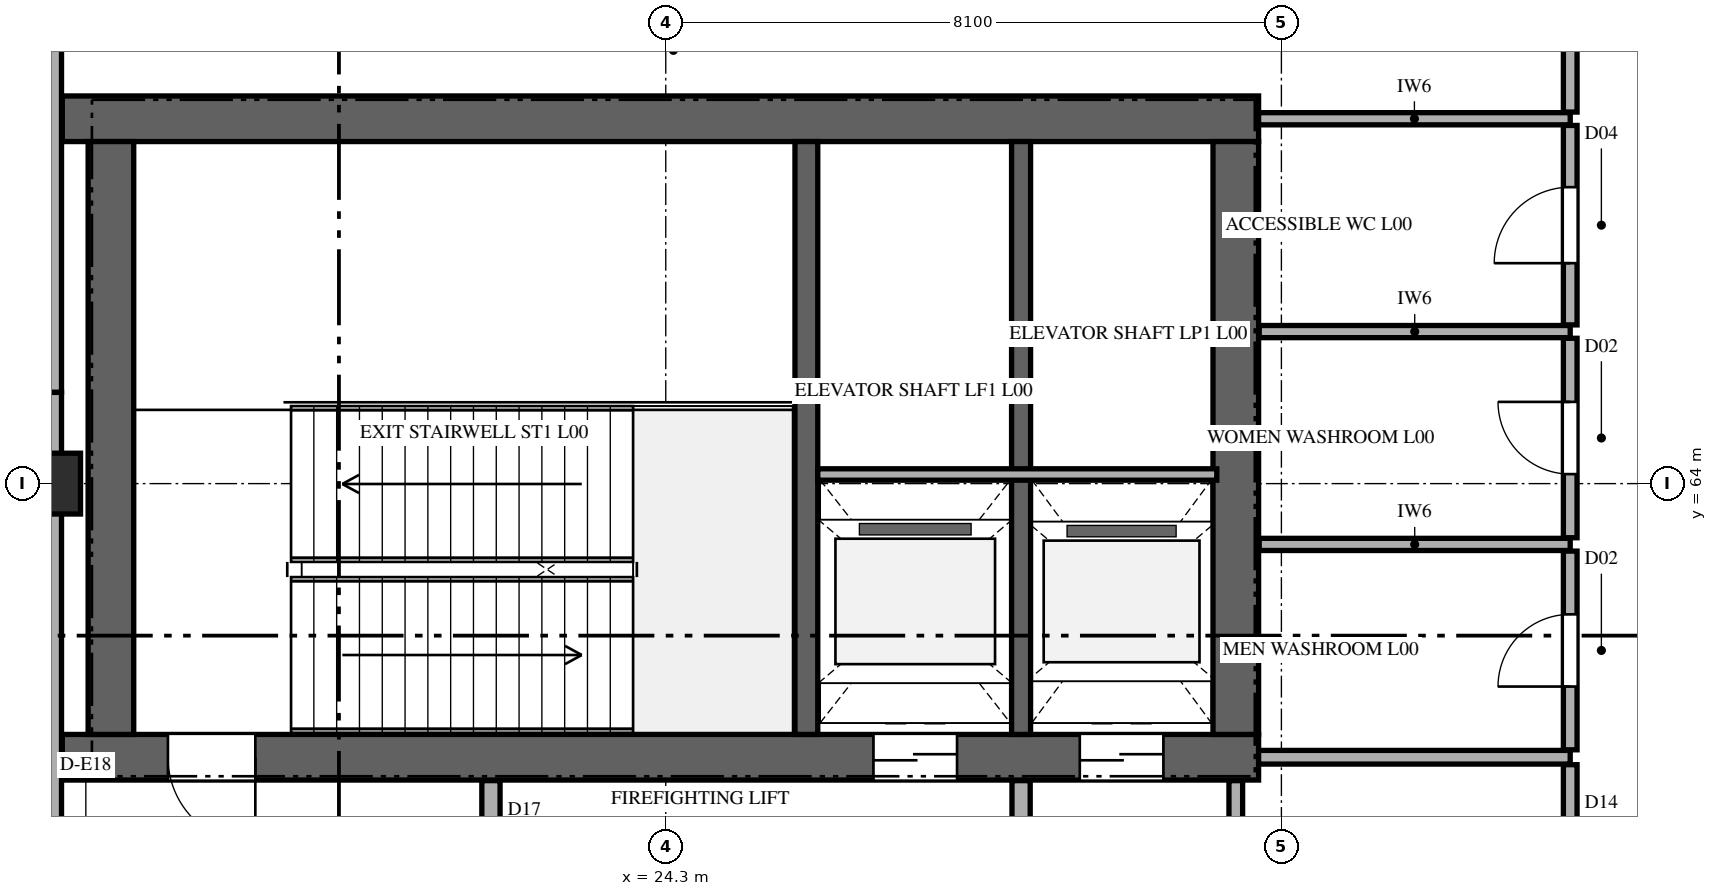
"""IFC4 building model, lengths in metres.
Left out: names, types, materials, properties, quantities, classifications, styles, units other than length and angle.
Written with IfcOpenShell. Run it as: python <this file> out.ifc"""

import sys

from ifc_helpers import new_model, si_unit, direction, frame, frame_2d, origin, origin_2d, place, context, subcontext, project, spatial, rectangle, extrude, element, fill, save


model = new_model("IFC4")
c1 = context("Model", 3, precision=1e-05, world=origin(), true_north=direction((0.0, 1.0)))
c2 = subcontext(c1, "Body", "Model", "MODEL_VIEW")
j1 = project(units=[si_unit("LENGTHUNIT", "METRE"), si_unit("PLANEANGLEUNIT", "RADIAN")], contexts=[c1])
p1 = place(None, origin())
s1 = spatial("IfcSite", under=j1, at=p1, CompositionType="ELEMENT")
p2 = place(p1, origin())
s2 = spatial("IfcBuilding", under=s1, at=p2, CompositionType="ELEMENT")
p3 = place(p2, origin())
s3 = spatial("IfcBuildingStorey", under=s2, at=p3, CompositionType="ELEMENT", Elevation=0.0)
p4 = place(p3, frame((16.36, 60.4, 0.0), z_axis=(0.0, 0.0, 1.0), x_axis=(1.0, 0.0, 0.0)))
e1 = element("IfcWall", 1, at=p4, inside=s3, PredefinedType="SHEAR", context=c2, shape_type="SweptSolid", body=[
    extrude(rectangle(XDim=15.74, YDim=0.6, at=frame_2d((7.87, 0.0))), origin(), (0.0, 0.0, 1.0), 5.4),
])
p5 = place(p4, frame((1.39, 0.0, 0.0)))
e2 = element("IfcOpeningElement", 2, at=p5, cuts=e1, PredefinedType="OPENING", context=c2, shape_type="SweptSolid", body=[
    extrude(rectangle(XDim=1.15, YDim=2.25, at=frame_2d((0.575, 1.125))), frame((0.0, 0.31, 0.0), z_axis=(0.0, -1.0, 0.0), x_axis=(1.0, 0.0, 0.0)), (0.0, 0.0, 1.0), 0.62),
])
p6 = place(p4, frame((10.673, 0.0, 0.0)))
e3 = element("IfcOpeningElement", 3, at=p6, cuts=e1, PredefinedType="OPENING", context=c2, shape_type="SweptSolid", body=[
    extrude(rectangle(XDim=1.1, YDim=2.2, at=frame_2d((0.55, 1.1))), frame((0.0, 0.31, 0.0), z_axis=(0.0, -1.0, 0.0), x_axis=(1.0, 0.0, 0.0)), (0.0, 0.0, 1.0), 0.62),
])
p7 = place(p4, frame((13.387, 0.0, 0.0)))
e4 = element("IfcOpeningElement", 4, at=p7, cuts=e1, PredefinedType="OPENING", context=c2, shape_type="SweptSolid", body=[
    extrude(rectangle(XDim=1.1, YDim=2.2, at=frame_2d((0.55, 1.1))), frame((0.0, 0.31, 0.0), z_axis=(0.0, -1.0, 0.0), x_axis=(1.0, 0.0, 0.0)), (0.0, 0.0, 1.0), 0.62),
])
p8 = place(p3, frame((16.36, 68.8, 0.0), z_axis=(0.0, 0.0, 1.0), x_axis=(1.0, 0.0, 0.0)))
e5 = element("IfcWall", 5, at=p8, inside=s3, PredefinedType="SHEAR", context=c2, shape_type="SweptSolid", body=[
    extrude(rectangle(XDim=15.74, YDim=0.6, at=frame_2d((7.87, 0.0))), origin(), (0.0, 0.0, 1.0), 5.4),
])
for number, where, z_axis, x_axis in (
    (6, (17.0, 60.7, 0.0), (0.0, 0.0, 1.0), (0.0, 1.0, 0.0)),
    (7, (31.8, 60.7, 0.0), (0.0, 0.0, 1.0), (0.0, 1.0, 0.0)),
):
    element("IfcWall", number, at=place(p3, frame(where, z_axis=z_axis, x_axis=x_axis)), inside=s3, PredefinedType="SHEAR", context=c2, shape_type="SweptSolid", body=[
        extrude(rectangle(XDim=7.8, YDim=0.6, at=frame_2d((3.9, 0.0))), origin(), (0.0, 0.0, 1.0), 5.4),
    ])
p9 = place(p3, frame((26.15, 60.7, 0.0), z_axis=(0.0, 0.0, 1.0), x_axis=(0.0, 1.0, 0.0)))
e8 = element("IfcWall", 8, at=p9, inside=s3, PredefinedType="SHEAR", context=c2, shape_type="SweptSolid", body=[
    extrude(rectangle(XDim=7.8, YDim=0.3, at=frame_2d((3.9, 0.0))), origin(), (0.0, 0.0, 1.0), 5.4),
])
p10 = place(p3, frame((28.975, 60.7, 0.0), z_axis=(0.0, 0.0, 1.0), x_axis=(0.0, 1.0, 0.0)))
e9 = element("IfcWall", 9, at=p10, inside=s3, PredefinedType="SHEAR", context=c2, shape_type="SweptSolid", body=[
    extrude(rectangle(XDim=7.8, YDim=0.25, at=frame_2d((3.9, 0.0))), origin(), (0.0, 0.0, 1.0), 5.4),
])
p11 = place(p3, frame((16.2, 64.0, 0.0), z_axis=(0.0, 0.0, 1.0), x_axis=(1.0, 0.0, 0.0)))
e10 = element("IfcColumn", 10, at=p11, inside=s3, PredefinedType="COLUMN", context=c2, shape_type="SweptSolid", body=[
    extrude(rectangle(XDim=0.8, YDim=0.8, at=origin_2d()), origin(), (0.0, 0.0, 1.0), 5.4),
])
p12 = place(p3, frame((16.2, 80.8, 0.0), z_axis=(0.0, 0.0, 1.0), x_axis=(0.0, -1.0, 0.0)))
e11 = element("IfcWall", 11, at=p12, inside=s3, PredefinedType="SOLIDWALL", context=c2, shape_type="SweptSolid", body=[
    extrude(rectangle(XDim=15.6, YDim=0.3, at=frame_2d((7.8, 0.0))), origin(), (0.0, 0.0, 1.0), 4.512),
])
p13 = place(p12, frame((4.36, 0.0, 0.0)))
e12 = element("IfcOpeningElement", 12, at=p13, cuts=e11, PredefinedType="OPENING", context=c2, shape_type="SweptSolid", body=[
    extrude(rectangle(XDim=2.2, YDim=2.6, at=frame_2d((1.1, 1.3))), frame((0.0, 0.16, 0.0), z_axis=(0.0, -1.0, 0.0), x_axis=(1.0, 0.0, 0.0)), (0.0, 0.0, 1.0), 0.32),
])
p14 = place(p3, frame((16.2, 65.2, 0.0), z_axis=(0.0, 0.0, 1.0), x_axis=(0.0, -1.0, 0.0)))
e13 = element("IfcWall", 13, at=p14, inside=s3, PredefinedType="SOLIDWALL", context=c2, shape_type="SweptSolid", body=[
    extrude(rectangle(XDim=15.6, YDim=0.3, at=frame_2d((7.8, 0.0))), origin(), (0.0, 0.0, 1.0), 4.512),
])
p15 = place(p14, frame((5.8, 0.0, 0.0)))
e14 = element("IfcOpeningElement", 14, at=p15, cuts=e13, PredefinedType="OPENING", context=c2, shape_type="SweptSolid", body=[
    extrude(rectangle(XDim=1.8, YDim=2.4, at=frame_2d((0.9, 1.2))), frame((0.0, 0.16, 0.0), z_axis=(0.0, -1.0, 0.0), x_axis=(1.0, 0.0, 0.0)), (0.0, 0.0, 1.0), 0.32),
])
p16 = place(p3, frame((26.3, 64.12, 0.0), z_axis=(0.0, 0.0, 1.0), x_axis=(1.0, 0.0, 0.0)))
e15 = element("IfcWall", 15, at=p16, inside=s3, PredefinedType="PARTITIONING", context=c2, shape_type="SweptSolid", body=[
    extrude(rectangle(XDim=5.25, YDim=0.15, at=frame_2d((2.625, 0.0))), origin(), (0.0, 0.0, 1.0), 5.12),
])
p17 = place(p3, frame((32.1, 60.4, 0.0), z_axis=(0.0, 0.0, 1.0), x_axis=(1.0, 0.0, 0.0)))
e16 = element("IfcWall", 16, at=p17, inside=s3, PredefinedType="PARTITIONING", context=c2, shape_type="SweptSolid", body=[
    extrude(rectangle(XDim=4.1, YDim=0.18, at=frame_2d((2.05, 0.0))), origin(), (0.0, 0.0, 1.0), 5.12),
])
for number, where, z_axis, x_axis in (
    (17, (32.108, 63.2, 0.0), (0.0, 0.0, 1.0), (1.0, 0.0, 0.0)),
    (18, (32.108, 66.0, 0.0), (0.0, 0.0, 1.0), (1.0, 0.0, 0.0)),
):
    element("IfcWall", number, at=place(p3, frame(where, z_axis=z_axis, x_axis=x_axis)), inside=s3, PredefinedType="PARTITIONING", context=c2, shape_type="SweptSolid", body=[
        extrude(rectangle(XDim=4.092, YDim=0.16, at=frame_2d((2.046, 0.0))), origin(), (0.0, 0.0, 1.0), 5.12),
    ])
p18 = place(p3, frame((32.1, 68.8, 0.0), z_axis=(0.0, 0.0, 1.0), x_axis=(1.0, 0.0, 0.0)))
e19 = element("IfcWall", 19, at=p18, inside=s3, PredefinedType="PARTITIONING", context=c2, shape_type="SweptSolid", body=[
    extrude(rectangle(XDim=4.1, YDim=0.16, at=frame_2d((2.05, 0.0))), origin(), (0.0, 0.0, 1.0), 5.12),
])
p19 = place(p3, frame((22.0, 56.928, 0.0), z_axis=(0.0, 0.0, 1.0), x_axis=(0.0, 1.0, 0.0)))
e20 = element("IfcWall", 20, at=p19, inside=s3, PredefinedType="PARTITIONING", context=c2, shape_type="SweptSolid", body=[
    extrude(rectangle(XDim=3.164, YDim=0.24, at=frame_2d((1.582, 0.0))), origin(), (0.0, 0.0, 1.0), 5.12),
])
p20 = place(p19, frame((1.082, 0.0, 0.0)))
e21 = element("IfcOpeningElement", 21, at=p20, cuts=e20, PredefinedType="OPENING", context=c2, shape_type="SweptSolid", body=[
    extrude(rectangle(XDim=1.0, YDim=2.2, at=frame_2d((0.5, 1.1))), frame((0.0, 0.13, 0.0), z_axis=(0.0, -1.0, 0.0), x_axis=(1.0, 0.0, 0.0)), (0.0, 0.0, 1.0), 0.26),
])
p21 = place(p3, frame((28.975, 56.928, 0.0), z_axis=(0.0, 0.0, 1.0), x_axis=(0.0, 1.0, 0.0)))
e22 = element("IfcWall", 22, at=p21, inside=s3, PredefinedType="PARTITIONING", context=c2, shape_type="SweptSolid", body=[
    extrude(rectangle(XDim=3.164, YDim=0.24, at=frame_2d((1.582, 0.0))), origin(), (0.0, 0.0, 1.0), 5.12),
])
p22 = place(p3, frame((31.8, 56.898, 0.0), z_axis=(0.0, 0.0, 1.0), x_axis=(0.0, 1.0, 0.0)))
e23 = element("IfcWall", 23, at=p22, inside=s3, PredefinedType="PARTITIONING", context=c2, shape_type="SweptSolid", body=[
    extrude(rectangle(XDim=3.194, YDim=0.18, at=frame_2d((1.597, 0.0))), origin(), (0.0, 0.0, 1.0), 5.12),
])
p23 = place(p3, frame((36.2, 56.898, 0.0), z_axis=(0.0, 0.0, 1.0), x_axis=(0.0, 1.0, 0.0)))
e24 = element("IfcWall", 24, at=p23, inside=s3, PredefinedType="PARTITIONING", context=c2, shape_type="SweptSolid", body=[
    extrude(rectangle(XDim=3.404, YDim=0.18, at=frame_2d((1.702, 0.0))), origin(), (0.0, 0.0, 1.0), 5.12),
])
p24 = place(p23, frame((1.202, 0.0, 0.0)))
e25 = element("IfcOpeningElement", 25, at=p24, cuts=e24, PredefinedType="OPENING", context=c2, shape_type="SweptSolid", body=[
    extrude(rectangle(XDim=1.0, YDim=2.15, at=frame_2d((0.5, 1.075))), frame((0.0, 0.1, 0.0), z_axis=(0.0, -1.0, 0.0), x_axis=(1.0, 0.0, 0.0)), (0.0, 0.0, 1.0), 0.2),
])
p25 = place(p3, frame((36.2, 60.498, 0.0), z_axis=(0.0, 0.0, 1.0), x_axis=(0.0, 1.0, 0.0)))
e26 = element("IfcWall", 26, at=p25, inside=s3, PredefinedType="PARTITIONING", context=c2, shape_type="SweptSolid", body=[
    extrude(rectangle(XDim=2.614, YDim=0.18, at=frame_2d((1.307, 0.0))), origin(), (0.0, 0.0, 1.0), 5.12),
])
p26 = place(p25, frame((0.832, 0.0, 0.0)))
e27 = element("IfcOpeningElement", 27, at=p26, cuts=e26, PredefinedType="OPENING", context=c2, shape_type="SweptSolid", body=[
    extrude(rectangle(XDim=0.95, YDim=2.1, at=frame_2d((0.475, 1.05))), frame((0.0, 0.1, 0.0), z_axis=(0.0, -1.0, 0.0), x_axis=(1.0, 0.0, 0.0)), (0.0, 0.0, 1.0), 0.2),
])
p27 = place(p3, frame((36.2, 63.288, 0.0), z_axis=(0.0, 0.0, 1.0), x_axis=(0.0, 1.0, 0.0)))
e28 = element("IfcWall", 28, at=p27, inside=s3, PredefinedType="PARTITIONING", context=c2, shape_type="SweptSolid", body=[
    extrude(rectangle(XDim=2.624, YDim=0.18, at=frame_2d((1.312, 0.0))), origin(), (0.0, 0.0, 1.0), 5.12),
])
p28 = place(p27, frame((0.837, 0.0, 0.0)))
e29 = element("IfcOpeningElement", 29, at=p28, cuts=e28, PredefinedType="OPENING", context=c2, shape_type="SweptSolid", body=[
    extrude(rectangle(XDim=0.95, YDim=2.1, at=frame_2d((0.475, 1.05))), frame((0.0, 0.1, 0.0), z_axis=(0.0, -1.0, 0.0), x_axis=(1.0, 0.0, 0.0)), (0.0, 0.0, 1.0), 0.2),
])
p29 = place(p3, frame((36.2, 66.088, 0.0), z_axis=(0.0, 0.0, 1.0), x_axis=(0.0, 1.0, 0.0)))
e30 = element("IfcWall", 30, at=p29, inside=s3, PredefinedType="PARTITIONING", context=c2, shape_type="SweptSolid", body=[
    extrude(rectangle(XDim=2.624, YDim=0.18, at=frame_2d((1.312, 0.0))), origin(), (0.0, 0.0, 1.0), 5.12),
])
p30 = place(p29, frame((0.812, 0.0, 0.0)))
e31 = element("IfcOpeningElement", 31, at=p30, cuts=e30, PredefinedType="OPENING", context=c2, shape_type="SweptSolid", body=[
    extrude(rectangle(XDim=1.0, YDim=2.15, at=frame_2d((0.5, 1.075))), frame((0.0, 0.1, 0.0), z_axis=(0.0, -1.0, 0.0), x_axis=(1.0, 0.0, 0.0)), (0.0, 0.0, 1.0), 0.2),
])
p31 = place(p3, frame((36.2, 68.888, 0.0), z_axis=(0.0, 0.0, 1.0), x_axis=(0.0, 1.0, 0.0)))
e32 = element("IfcWall", 32, at=p31, inside=s3, PredefinedType="PARTITIONING", context=c2, shape_type="SweptSolid", body=[
    extrude(rectangle(XDim=14.044, YDim=0.18, at=frame_2d((7.022, 0.0))), origin(), (0.0, 0.0, 1.0), 4.705),
])
p32 = place(p31, frame((6.472, 0.0, 0.0)))
e33 = element("IfcOpeningElement", 33, at=p32, cuts=e32, PredefinedType="OPENING", context=c2, shape_type="SweptSolid", body=[
    extrude(rectangle(XDim=1.1, YDim=2.2, at=frame_2d((0.55, 1.1))), frame((0.0, 0.1, 0.0), z_axis=(0.0, -1.0, 0.0), x_axis=(1.0, 0.0, 0.0)), (0.0, 0.0, 1.0), 0.2),
])
p33 = place(p5, frame((1.15, 0.0, 0.0), z_axis=(0.0, 0.0, 1.0), x_axis=(-1.0, 0.0, 0.0)))
e34 = element("IfcDoor", 34, at=p33, inside=s3, OperationType="SINGLE_SWING_RIGHT", PredefinedType="DOOR", context=c2, shape_type="SweptSolid", body=[
    extrude(rectangle(XDim=1.15, YDim=2.25, at=frame_2d((0.575, 1.125))), frame((0.0, 0.025, 0.0), z_axis=(0.0, -1.0, 0.0), x_axis=(1.0, 0.0, 0.0)), (0.0, 0.0, 1.0), 0.05),
])
fill(e2, e34)
p34 = place(p6, frame((1.1, 0.0, 0.0), z_axis=(0.0, 0.0, 1.0), x_axis=(-1.0, 0.0, 0.0)))
e35 = element("IfcDoor", 35, at=p34, inside=s3, OperationType="DOUBLE_DOOR_SLIDING", PredefinedType="DOOR", context=c2, shape_type="SweptSolid", body=[
    extrude(rectangle(XDim=1.1, YDim=2.2, at=frame_2d((0.55, 1.1))), frame((0.0, 0.025, 0.0), z_axis=(0.0, -1.0, 0.0), x_axis=(1.0, 0.0, 0.0)), (0.0, 0.0, 1.0), 0.05),
])
fill(e3, e35)
p35 = place(p7, frame((1.1, 0.0, 0.0), z_axis=(0.0, 0.0, 1.0), x_axis=(-1.0, 0.0, 0.0)))
e36 = element("IfcDoor", 36, at=p35, inside=s3, OperationType="DOUBLE_DOOR_SLIDING", PredefinedType="DOOR", context=c2, shape_type="SweptSolid", body=[
    extrude(rectangle(XDim=1.1, YDim=2.2, at=frame_2d((0.55, 1.1))), frame((0.0, 0.025, 0.0), z_axis=(0.0, -1.0, 0.0), x_axis=(1.0, 0.0, 0.0)), (0.0, 0.0, 1.0), 0.05),
])
fill(e4, e36)
p36 = place(p26, origin())
e37 = element("IfcDoor", 37, at=p36, inside=s3, OperationType="SINGLE_SWING_LEFT", PredefinedType="DOOR", context=c2, shape_type="SweptSolid", body=[
    extrude(rectangle(XDim=0.95, YDim=2.1, at=frame_2d((0.475, 1.05))), frame((0.0, 0.025, 0.0), z_axis=(0.0, -1.0, 0.0), x_axis=(1.0, 0.0, 0.0)), (0.0, 0.0, 1.0), 0.05),
])
fill(e27, e37)
p37 = place(p28, origin())
e38 = element("IfcDoor", 38, at=p37, inside=s3, OperationType="SINGLE_SWING_RIGHT", PredefinedType="DOOR", context=c2, shape_type="SweptSolid", body=[
    extrude(rectangle(XDim=0.95, YDim=2.1, at=frame_2d((0.475, 1.05))), frame((0.0, 0.025, 0.0), z_axis=(0.0, -1.0, 0.0), x_axis=(1.0, 0.0, 0.0)), (0.0, 0.0, 1.0), 0.05),
])
fill(e29, e38)
p38 = place(p30, origin())
e39 = element("IfcDoor", 39, at=p38, inside=s3, OperationType="SINGLE_SWING_LEFT", PredefinedType="DOOR", context=c2, shape_type="SweptSolid", body=[
    extrude(rectangle(XDim=1.0, YDim=2.15, at=frame_2d((0.5, 1.075))), frame((0.0, 0.025, 0.0), z_axis=(0.0, -1.0, 0.0), x_axis=(1.0, 0.0, 0.0)), (0.0, 0.0, 1.0), 0.05),
])
fill(e31, e39)
save(model, sys.argv[1])
